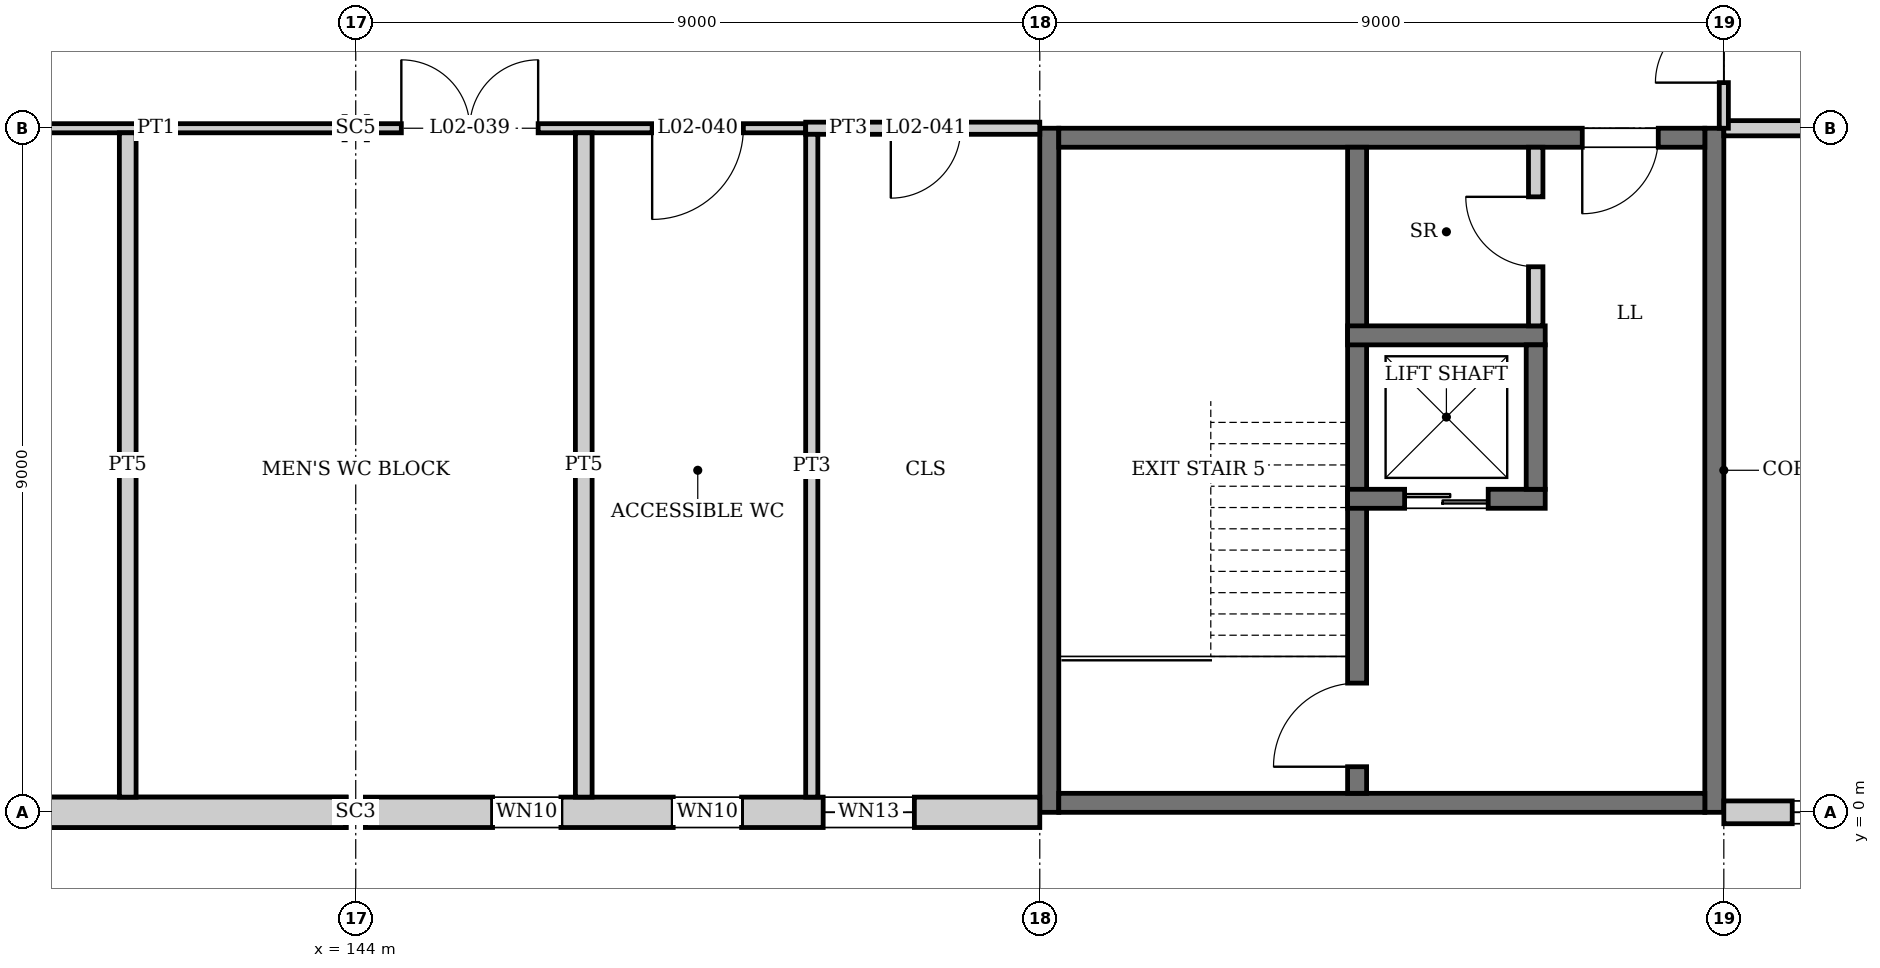
"""IFC4 building model, lengths in metres.
Left out: names, types, materials, properties, quantities, classifications, styles, units other than length and angle.
Written with IfcOpenShell. Run it as: python <this file> out.ifc"""

import sys

from ifc_helpers import new_model, si_unit, direction, frame, frame_2d, origin, origin_2d, place, context, subcontext, project, spatial, polyline, rectangle, i_section, outline, extrude, element, fill, save


model = new_model("IFC4")
c1 = context("Model", 3, precision=1e-05, world=origin(), true_north=direction((0.0, 1.0)))
c2 = subcontext(c1, "Body", "Model", "MODEL_VIEW")
j1 = project(units=[si_unit("LENGTHUNIT", "METRE"), si_unit("PLANEANGLEUNIT", "RADIAN")], contexts=[c1])
p1 = place(None, origin())
s1 = spatial("IfcSite", under=j1, at=p1, CompositionType="ELEMENT")
p2 = place(p1, origin())
s2 = spatial("IfcBuilding", under=s1, at=p2, CompositionType="ELEMENT")
p3 = place(p2, frame((0.0, 0.0, 10.5)))
s3 = spatial("IfcBuildingStorey", under=s2, at=p3, CompositionType="ELEMENT", Elevation=10.5)
p4 = place(p3, frame((144.0, 0.0, 0.0), z_axis=(0.0, 0.0, 1.0), x_axis=(0.0, 1.0, 0.0)))
e1 = element("IfcColumn", 1, at=p4, inside=s3, PredefinedType="COLUMN", context=c2, shape_type="SweptSolid", body=[
    extrude(i_section(OverallWidth=0.254, OverallDepth=0.254, WebThickness=0.009, FlangeThickness=0.014, at=origin_2d()), origin(), (0.0, 0.0, 1.0), 4.5),
])
p5 = place(p3, frame((144.0, 9.0, 0.0), z_axis=(0.0, 0.0, 1.0), x_axis=(0.0, 1.0, 0.0)))
e2 = element("IfcColumn", 2, at=p5, inside=s3, PredefinedType="COLUMN", context=c2, shape_type="SweptSolid", body=[
    extrude(i_section(OverallWidth=0.305, OverallDepth=0.308, WebThickness=0.01, FlangeThickness=0.015, at=origin_2d()), origin(), (0.0, 0.0, 1.0), 4.5),
])
for number, where, z_axis, x_axis in (
    (3, (153.125, 0.0, 0.0), (0.0, 0.0, 1.0), (0.0, 1.0, 0.0)),
    (4, (161.875, 0.0, 0.0), (0.0, 0.0, 1.0), (0.0, 1.0, 0.0)),
):
    element("IfcWall", number, at=place(p3, frame(where, z_axis=z_axis, x_axis=x_axis)), inside=s3, PredefinedType="SHEAR", context=c2, shape_type="SweptSolid", body=[
        extrude(rectangle(XDim=9.0, YDim=0.25, at=frame_2d((4.5, 0.0))), origin(), (0.0, 0.0, 1.0), 4.35),
    ])
p6 = place(p3, frame((153.25, 0.125, 0.0), z_axis=(0.0, 0.0, 1.0), x_axis=(1.0, 0.0, 0.0)))
e5 = element("IfcWall", 5, at=p6, inside=s3, PredefinedType="SHEAR", context=c2, shape_type="SweptSolid", body=[
    extrude(rectangle(XDim=8.5, YDim=0.25, at=frame_2d((4.25, 0.0))), origin(), (0.0, 0.0, 1.0), 4.35),
])
p7 = place(p3, frame((153.25, 8.875, 0.0), z_axis=(0.0, 0.0, 1.0), x_axis=(1.0, 0.0, 0.0)))
e6 = element("IfcWall", 6, at=p7, inside=s3, PredefinedType="SHEAR", context=c2, shape_type="SweptSolid", body=[
    extrude(rectangle(XDim=8.5, YDim=0.25, at=frame_2d((4.25, 0.0))), origin(), (0.0, 0.0, 1.0), 4.35),
])
p8 = place(p7, frame((6.887, 0.0, 0.0)))
e7 = element("IfcOpeningElement", 7, at=p8, cuts=e6, PredefinedType="OPENING", context=c2, shape_type="SweptSolid", body=[
    extrude(rectangle(XDim=1.0, YDim=2.1, at=frame_2d((0.5, 1.05))), frame((0.0, 0.135, 0.0), z_axis=(0.0, -1.0, 0.0), x_axis=(1.0, 0.0, 0.0)), (0.0, 0.0, 1.0), 0.27),
])
p9 = place(p3, frame((135.127, 0.0, 0.0), z_axis=(0.0, 0.0, 1.0), x_axis=(1.0, 0.0, 0.0)))
e8 = element("IfcWall", 8, at=p9, inside=s3, PredefinedType="SOLIDWALL", context=c2, shape_type="SweptSolid", body=[
    extrude(outline(polyline([(8.746, 0.0), (0.0, 0.0), (0.0, 3.86), (8.698, 0.38), (8.746, 0.5), (8.746, 0.0)])), frame((0.0, 0.2, 0.0), z_axis=(0.0, -1.0, 0.0), x_axis=(1.0, 0.0, 0.0)), (0.0, 0.0, 1.0), 0.4),
])
p10 = place(p3, frame((135.127, 0.0, 0.0), z_axis=(0.0, 0.0, 1.0), x_axis=(1.0, 0.0, 0.0)))
e9 = element("IfcWall", 9, at=p10, inside=s3, PredefinedType="SOLIDWALL", context=c2, shape_type="SweptSolid", body=[
    extrude(outline(polyline([(8.746, 3.991), (8.746, 0.64), (0.371, 3.991), (8.746, 3.991)])), frame((0.0, 0.2, 0.0), z_axis=(0.0, -1.0, 0.0), x_axis=(1.0, 0.0, 0.0)), (0.0, 0.0, 1.0), 0.4),
])
p11 = place(p3, frame((144.127, 0.0, 0.0), z_axis=(0.0, 0.0, 1.0), x_axis=(1.0, 0.0, 0.0)))
e10 = element("IfcWall", 10, at=p11, inside=s3, PredefinedType="SOLIDWALL", context=c2, shape_type="SweptSolid", body=[
    extrude(rectangle(XDim=8.873, YDim=0.4, at=frame_2d((4.437, 0.0))), origin(), (0.0, 0.0, 1.0), 3.991),
])
p12 = place(p11, frame((1.673, 0.0, 1.7)))
e11 = element("IfcOpeningElement", 11, at=p12, cuts=e10, PredefinedType="OPENING", context=c2, shape_type="SweptSolid", body=[
    extrude(rectangle(XDim=0.9, YDim=0.6, at=frame_2d((0.45, 0.3))), frame((0.0, 0.21, 0.0), z_axis=(0.0, -1.0, 0.0), x_axis=(1.0, 0.0, 0.0)), (0.0, 0.0, 1.0), 0.42),
])
p13 = place(p11, frame((6.023, 0.0, 1.2)))
e12 = element("IfcOpeningElement", 12, at=p13, cuts=e10, PredefinedType="OPENING", context=c2, shape_type="SweptSolid", body=[
    extrude(rectangle(XDim=1.2, YDim=1.2, at=frame_2d((0.6, 0.6))), frame((0.0, 0.21, 0.0), z_axis=(0.0, -1.0, 0.0), x_axis=(1.0, 0.0, 0.0)), (0.0, 0.0, 1.0), 0.42),
])
p14 = place(p11, frame((4.05, 0.0, 1.7)))
e13 = element("IfcOpeningElement", 13, at=p14, cuts=e10, PredefinedType="OPENING", context=c2, shape_type="SweptSolid", body=[
    extrude(rectangle(XDim=0.9, YDim=0.6, at=frame_2d((0.45, 0.3))), frame((0.0, 0.21, 0.0), z_axis=(0.0, -1.0, 0.0), x_axis=(1.0, 0.0, 0.0)), (0.0, 0.0, 1.0), 0.42),
])
p15 = place(p3, frame((162.0, 0.0, 0.0), z_axis=(0.0, 0.0, 1.0), x_axis=(1.0, 0.0, 0.0)))
e14 = element("IfcWall", 14, at=p15, inside=s3, PredefinedType="SOLIDWALL", context=c2, shape_type="SweptSolid", body=[
    extrude(rectangle(XDim=8.873, YDim=0.3, at=frame_2d((4.437, 0.0))), origin(), (0.0, 0.0, 1.0), 3.991),
])
p16 = place(p15, frame((0.9, 0.0, 0.9)))
e15 = element("IfcOpeningElement", 15, at=p16, cuts=e14, PredefinedType="OPENING", context=c2, shape_type="SweptSolid", body=[
    extrude(rectangle(XDim=2.7, YDim=1.8, at=frame_2d((1.35, 0.9))), frame((0.0, 0.16, 0.0), z_axis=(0.0, -1.0, 0.0), x_axis=(1.0, 0.0, 0.0)), (0.0, 0.0, 1.0), 0.32),
])
p17 = place(p15, frame((5.4, 0.0, 0.9)))
e16 = element("IfcOpeningElement", 16, at=p17, cuts=e14, PredefinedType="OPENING", context=c2, shape_type="SweptSolid", body=[
    extrude(rectangle(XDim=2.7, YDim=1.8, at=frame_2d((1.35, 0.9))), frame((0.0, 0.16, 0.0), z_axis=(0.0, -1.0, 0.0), x_axis=(1.0, 0.0, 0.0)), (0.0, 0.0, 1.0), 0.32),
])
p18 = place(p3, frame((157.175, 0.25, 0.0), z_axis=(0.0, 0.0, 1.0), x_axis=(0.0, 1.0, 0.0)))
e17 = element("IfcWall", 17, at=p18, inside=s3, PredefinedType="SOLIDWALL", context=c2, shape_type="SweptSolid", body=[
    extrude(rectangle(XDim=8.5, YDim=0.25, at=frame_2d((4.25, 0.0))), origin(), (0.0, 0.0, 1.0), 4.35),
])
p19 = place(p18, frame((0.35, 0.0, 0.0)))
e18 = element("IfcOpeningElement", 18, at=p19, cuts=e17, PredefinedType="OPENING", context=c2, shape_type="SweptSolid", body=[
    extrude(rectangle(XDim=1.1, YDim=2.1, at=frame_2d((0.55, 1.05))), frame((0.0, 0.135, 0.0), z_axis=(0.0, -1.0, 0.0), x_axis=(1.0, 0.0, 0.0)), (0.0, 0.0, 1.0), 0.27),
])
p20 = place(p3, frame((157.05, 4.125, 0.0), z_axis=(0.0, 0.0, 1.0), x_axis=(1.0, 0.0, 0.0)))
e19 = element("IfcWall", 19, at=p20, inside=s3, PredefinedType="SOLIDWALL", context=c2, shape_type="SweptSolid", body=[
    extrude(rectangle(XDim=2.6, YDim=0.25, at=frame_2d((1.3, 0.0))), origin(), (0.0, 0.0, 1.0), 4.35),
])
p21 = place(p20, frame((0.75, 0.0, 0.0)))
e20 = element("IfcOpeningElement", 20, at=p21, cuts=e19, PredefinedType="OPENING", context=c2, shape_type="SweptSolid", body=[
    extrude(rectangle(XDim=1.1, YDim=2.1, at=frame_2d((0.55, 1.05))), frame((0.0, 0.135, 0.0), z_axis=(0.0, -1.0, 0.0), x_axis=(1.0, 0.0, 0.0)), (0.0, 0.0, 1.0), 0.27),
])
p22 = place(p3, frame((157.05, 6.275, 0.0), z_axis=(0.0, 0.0, 1.0), x_axis=(1.0, 0.0, 0.0)))
e21 = element("IfcWall", 21, at=p22, inside=s3, PredefinedType="SOLIDWALL", context=c2, shape_type="SweptSolid", body=[
    extrude(rectangle(XDim=2.6, YDim=0.25, at=frame_2d((1.3, 0.0))), origin(), (0.0, 0.0, 1.0), 4.35),
])
p23 = place(p3, frame((159.525, 4.25, 0.0), z_axis=(0.0, 0.0, 1.0), x_axis=(0.0, 1.0, 0.0)))
e22 = element("IfcWall", 22, at=p23, inside=s3, PredefinedType="SOLIDWALL", context=c2, shape_type="SweptSolid", body=[
    extrude(rectangle(XDim=1.9, YDim=0.25, at=frame_2d((0.95, 0.0))), origin(), (0.0, 0.0, 1.0), 4.35),
])
p24 = place(p3, frame((135.154, 9.0, 0.0), z_axis=(0.0, 0.0, 1.0), x_axis=(1.0, 0.0, 0.0)))
e23 = element("IfcWall", 23, at=p24, inside=s3, PredefinedType="PARTITIONING", context=c2, shape_type="SweptSolid", body=[
    extrude(rectangle(XDim=8.692, YDim=0.12, at=frame_2d((4.346, 0.0))), origin(), (0.0, 0.0, 1.0), 2.414),
])
p25 = place(p24, frame((1.946, 0.0, 0.0)))
e24 = element("IfcOpeningElement", 24, at=p25, cuts=e23, PredefinedType="OPENING", context=c2, shape_type="SweptSolid", body=[
    extrude(rectangle(XDim=1.8, YDim=2.1, at=frame_2d((0.9, 1.05))), frame((0.0, 0.07, 0.0), z_axis=(0.0, -1.0, 0.0), x_axis=(1.0, 0.0, 0.0)), (0.0, 0.0, 1.0), 0.14),
])
p26 = place(p3, frame((144.154, 9.0, 0.0), z_axis=(0.0, 0.0, 1.0), x_axis=(1.0, 0.0, 0.0)))
e25 = element("IfcWall", 25, at=p26, inside=s3, PredefinedType="PARTITIONING", context=c2, shape_type="SweptSolid", body=[
    extrude(rectangle(XDim=5.766, YDim=0.12, at=frame_2d((2.883, 0.0))), origin(), (0.0, 0.0, 1.0), 2.414),
])
p27 = place(p26, frame((0.446, 0.0, 0.0)))
e26 = element("IfcOpeningElement", 26, at=p27, cuts=e25, PredefinedType="OPENING", context=c2, shape_type="SweptSolid", body=[
    extrude(rectangle(XDim=1.8, YDim=2.1, at=frame_2d((0.9, 1.05))), frame((0.0, 0.07, 0.0), z_axis=(0.0, -1.0, 0.0), x_axis=(1.0, 0.0, 0.0)), (0.0, 0.0, 1.0), 0.14),
])
p28 = place(p26, frame((3.746, 0.0, 0.0)))
e27 = element("IfcOpeningElement", 27, at=p28, cuts=e25, PredefinedType="OPENING", context=c2, shape_type="SweptSolid", body=[
    extrude(rectangle(XDim=1.2, YDim=2.1, at=frame_2d((0.6, 1.05))), frame((0.0, 0.07, 0.0), z_axis=(0.0, -1.0, 0.0), x_axis=(1.0, 0.0, 0.0)), (0.0, 0.0, 1.0), 0.14),
])
p29 = place(p3, frame((149.92, 9.0, 0.0), z_axis=(0.0, 0.0, 1.0), x_axis=(1.0, 0.0, 0.0)))
e28 = element("IfcWall", 28, at=p29, inside=s3, PredefinedType="PARTITIONING", context=c2, shape_type="SweptSolid", body=[
    extrude(rectangle(XDim=3.08, YDim=0.16, at=frame_2d((1.54, 0.0))), origin(), (0.0, 0.0, 1.0), 2.414),
])
p30 = place(p29, frame((1.12, 0.0, 0.0)))
e29 = element("IfcOpeningElement", 29, at=p30, cuts=e28, PredefinedType="OPENING", context=c2, shape_type="SweptSolid", body=[
    extrude(rectangle(XDim=0.92, YDim=2.1, at=frame_2d((0.46, 1.05))), frame((0.0, 0.09, 0.0), z_axis=(0.0, -1.0, 0.0), x_axis=(1.0, 0.0, 0.0)), (0.0, 0.0, 1.0), 0.18),
])
p31 = place(p3, frame((162.0, 9.0, 0.0), z_axis=(0.0, 0.0, 1.0), x_axis=(1.0, 0.0, 0.0)))
e30 = element("IfcWall", 30, at=p31, inside=s3, PredefinedType="PARTITIONING", context=c2, shape_type="SweptSolid", body=[
    extrude(rectangle(XDim=8.87, YDim=0.2, at=frame_2d((4.435, 0.0))), origin(), (0.0, 0.0, 1.0), 3.822),
])
for number, where, z_axis, x_axis in (
    (31, (141.0, 0.2, 0.0), (0.0, 0.0, 1.0), (0.0, 1.0, 0.0)),
    (32, (147.0, 0.2, 0.0), (0.0, 0.0, 1.0), (0.0, 1.0, 0.0)),
):
    element("IfcWall", number, at=place(p3, frame(where, z_axis=z_axis, x_axis=x_axis)), inside=s3, PredefinedType="PLUMBINGWALL", context=c2, shape_type="SweptSolid", body=[
        extrude(rectangle(XDim=8.74, YDim=0.22, at=frame_2d((4.37, 0.0))), origin(), (0.0, 0.0, 1.0), 3.991),
    ])
p32 = place(p3, frame((150.0, 0.2, 0.0), z_axis=(0.0, 0.0, 1.0), x_axis=(0.0, 1.0, 0.0)))
e33 = element("IfcWall", 33, at=p32, inside=s3, PredefinedType="PARTITIONING", context=c2, shape_type="SweptSolid", body=[
    extrude(rectangle(XDim=8.72, YDim=0.16, at=frame_2d((4.36, 0.0))), origin(), (0.0, 0.0, 1.0), 3.991),
])
p33 = place(p3, frame((159.525, 6.4, 0.0), z_axis=(0.0, 0.0, 1.0), x_axis=(0.0, 1.0, 0.0)))
e34 = element("IfcWall", 34, at=p33, inside=s3, PredefinedType="PARTITIONING", context=c2, shape_type="SweptSolid", body=[
    extrude(rectangle(XDim=2.35, YDim=0.19, at=frame_2d((1.175, 0.0))), origin(), (0.0, 0.0, 1.0), 4.35),
])
p34 = place(p33, frame((0.778, 0.0, 0.0)))
e35 = element("IfcOpeningElement", 35, at=p34, cuts=e34, PredefinedType="OPENING", context=c2, shape_type="SweptSolid", body=[
    extrude(rectangle(XDim=0.92, YDim=2.1, at=frame_2d((0.46, 1.05))), frame((0.0, 0.105, 0.0), z_axis=(0.0, -1.0, 0.0), x_axis=(1.0, 0.0, 0.0)), (0.0, 0.0, 1.0), 0.21),
])
p35 = place(p3, frame((162.0, 9.0, 0.0), z_axis=(0.0, 0.0, 1.0), x_axis=(0.0, 1.0, 0.0)))
e36 = element("IfcWall", 36, at=p35, inside=s3, PredefinedType="PARTITIONING", context=c2, shape_type="SweptSolid", body=[
    extrude(rectangle(XDim=3.0, YDim=0.12, at=frame_2d((1.5, 0.0))), origin(), (0.0, 0.0, 1.0), 2.414),
])
p36 = place(p35, frame((0.6, 0.0, 0.0)))
e37 = element("IfcOpeningElement", 37, at=p36, cuts=e36, PredefinedType="OPENING", context=c2, shape_type="SweptSolid", body=[
    extrude(rectangle(XDim=1.8, YDim=2.1, at=frame_2d((0.9, 1.05))), frame((0.0, 0.07, 0.0), z_axis=(0.0, -1.0, 0.0), x_axis=(1.0, 0.0, 0.0)), (0.0, 0.0, 1.0), 0.14),
])
p37 = place(p12, origin())
e38 = element("IfcWindow", 38, at=p37, inside=s3, PartitioningType="SINGLE_PANEL", PredefinedType="WINDOW", context=c2, shape_type="SweptSolid", body=[
    extrude(rectangle(XDim=0.9, YDim=0.6, at=frame_2d((0.45, 0.3))), frame((0.0, 0.03, 0.0), z_axis=(0.0, -1.0, 0.0), x_axis=(1.0, 0.0, 0.0)), (0.0, 0.0, 1.0), 0.06),
])
fill(e11, e38)
p38 = place(p13, origin())
e39 = element("IfcWindow", 39, at=p38, inside=s3, PartitioningType="SINGLE_PANEL", PredefinedType="WINDOW", context=c2, shape_type="SweptSolid", body=[
    extrude(rectangle(XDim=1.2, YDim=1.2, at=frame_2d((0.6, 0.6))), frame((0.0, 0.03, 0.0), z_axis=(0.0, -1.0, 0.0), x_axis=(1.0, 0.0, 0.0)), (0.0, 0.0, 1.0), 0.06),
])
fill(e12, e39)
p39 = place(p14, origin())
e40 = element("IfcWindow", 40, at=p39, inside=s3, PartitioningType="SINGLE_PANEL", PredefinedType="WINDOW", context=c2, shape_type="SweptSolid", body=[
    extrude(rectangle(XDim=0.9, YDim=0.6, at=frame_2d((0.45, 0.3))), frame((0.0, 0.03, 0.0), z_axis=(0.0, -1.0, 0.0), x_axis=(1.0, 0.0, 0.0)), (0.0, 0.0, 1.0), 0.06),
])
fill(e13, e40)
p40 = place(p16, origin())
e41 = element("IfcWindow", 41, at=p40, inside=s3, PartitioningType="SINGLE_PANEL", PredefinedType="WINDOW", context=c2, shape_type="SweptSolid", body=[
    extrude(rectangle(XDim=2.7, YDim=1.8, at=frame_2d((1.35, 0.9))), frame((0.0, 0.03, 0.0), z_axis=(0.0, -1.0, 0.0), x_axis=(1.0, 0.0, 0.0)), (0.0, 0.0, 1.0), 0.06),
])
fill(e15, e41)
p41 = place(p21, origin())
e42 = element("IfcDoor", 42, at=p41, inside=s3, OperationType="DOUBLE_DOOR_SLIDING", PredefinedType="DOOR", context=c2, shape_type="SweptSolid", body=[
    extrude(rectangle(XDim=1.1, YDim=2.1, at=frame_2d((0.55, 1.05))), frame((0.0, 0.025, 0.0), z_axis=(0.0, -1.0, 0.0), x_axis=(1.0, 0.0, 0.0)), (0.0, 0.0, 1.0), 0.05),
])
fill(e20, e42)
p42 = place(p19, origin())
e43 = element("IfcDoor", 43, at=p42, inside=s3, OperationType="SINGLE_SWING_LEFT", PredefinedType="DOOR", context=c2, shape_type="SweptSolid", body=[
    extrude(rectangle(XDim=1.1, YDim=2.1, at=frame_2d((0.55, 1.05))), frame((0.0, 0.025, 0.0), z_axis=(0.0, -1.0, 0.0), x_axis=(1.0, 0.0, 0.0)), (0.0, 0.0, 1.0), 0.05),
])
fill(e18, e43)
p43 = place(p8, frame((1.0, 0.0, 0.0), z_axis=(0.0, 0.0, 1.0), x_axis=(-1.0, 0.0, 0.0)))
e44 = element("IfcDoor", 44, at=p43, inside=s3, OperationType="SINGLE_SWING_RIGHT", PredefinedType="DOOR", context=c2, shape_type="SweptSolid", body=[
    extrude(rectangle(XDim=1.0, YDim=2.1, at=frame_2d((0.5, 1.05))), frame((0.0, 0.025, 0.0), z_axis=(0.0, -1.0, 0.0), x_axis=(1.0, 0.0, 0.0)), (0.0, 0.0, 1.0), 0.05),
])
fill(e7, e44)
p44 = place(p34, origin())
e45 = element("IfcDoor", 45, at=p44, inside=s3, OperationType="SINGLE_SWING_RIGHT", PredefinedType="DOOR", context=c2, shape_type="SweptSolid", body=[
    extrude(rectangle(XDim=0.92, YDim=2.1, at=frame_2d((0.46, 1.05))), frame((0.0, 0.025, 0.0), z_axis=(0.0, -1.0, 0.0), x_axis=(1.0, 0.0, 0.0)), (0.0, 0.0, 1.0), 0.05),
])
fill(e35, e45)
p45 = place(p27, origin())
e46 = element("IfcDoor", 46, at=p45, inside=s3, OperationType="DOUBLE_DOOR_SINGLE_SWING", PredefinedType="DOOR", context=c2, shape_type="SweptSolid", body=[
    extrude(rectangle(XDim=1.8, YDim=2.1, at=frame_2d((0.9, 1.05))), frame((0.0, 0.025, 0.0), z_axis=(0.0, -1.0, 0.0), x_axis=(1.0, 0.0, 0.0)), (0.0, 0.0, 1.0), 0.05),
])
fill(e26, e46)
p46 = place(p28, frame((1.2, 0.0, 0.0), z_axis=(0.0, 0.0, 1.0), x_axis=(-1.0, 0.0, 0.0)))
e47 = element("IfcDoor", 47, at=p46, inside=s3, OperationType="SINGLE_SWING_RIGHT", PredefinedType="DOOR", context=c2, shape_type="SweptSolid", body=[
    extrude(rectangle(XDim=1.2, YDim=2.1, at=frame_2d((0.6, 1.05))), frame((0.0, 0.025, 0.0), z_axis=(0.0, -1.0, 0.0), x_axis=(1.0, 0.0, 0.0)), (0.0, 0.0, 1.0), 0.05),
])
fill(e27, e47)
p47 = place(p30, frame((0.92, 0.0, 0.0), z_axis=(0.0, 0.0, 1.0), x_axis=(-1.0, 0.0, 0.0)))
e48 = element("IfcDoor", 48, at=p47, inside=s3, OperationType="SINGLE_SWING_RIGHT", PredefinedType="DOOR", context=c2, shape_type="SweptSolid", body=[
    extrude(rectangle(XDim=0.92, YDim=2.1, at=frame_2d((0.46, 1.05))), frame((0.0, 0.025, 0.0), z_axis=(0.0, -1.0, 0.0), x_axis=(1.0, 0.0, 0.0)), (0.0, 0.0, 1.0), 0.05),
])
fill(e29, e48)
p48 = place(p36, origin())
e49 = element("IfcDoor", 49, at=p48, inside=s3, OperationType="DOUBLE_DOOR_SINGLE_SWING", PredefinedType="DOOR", context=c2, shape_type="SweptSolid", body=[
    extrude(rectangle(XDim=1.8, YDim=2.1, at=frame_2d((0.9, 1.05))), frame((0.0, 0.025, 0.0), z_axis=(0.0, -1.0, 0.0), x_axis=(1.0, 0.0, 0.0)), (0.0, 0.0, 1.0), 0.05),
])
fill(e37, e49)
save(model, sys.argv[1])
